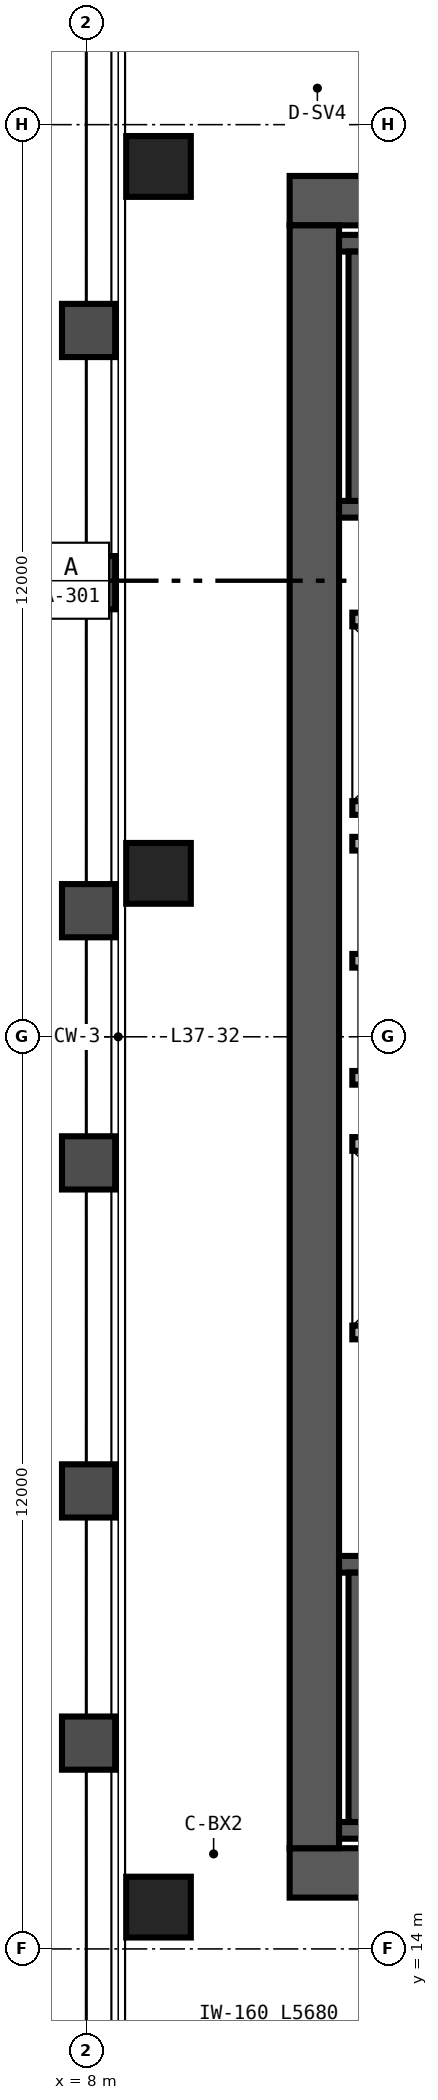
"""IFC4 building model, lengths in metres.
Left out: names, types, materials, properties, quantities, classifications, styles, units other than length and angle.
Written with IfcOpenShell. Run it as: python <this file> out.ifc"""

import sys

from ifc_helpers import new_model, si_unit, direction, frame, frame_2d, origin, origin_2d, place, context, subcontext, project, spatial, rectangle, hollow_rectangle, extrude, source, transform, mapped, element, save


model = new_model("IFC4")
c1 = context("Model", 3, precision=1e-05, world=origin(), true_north=direction((0.0, 1.0)))
c2 = subcontext(c1, "Body", "Model", "MODEL_VIEW")
j1 = project(units=[si_unit("LENGTHUNIT", "METRE"), si_unit("PLANEANGLEUNIT", "RADIAN")], contexts=[c1])
p1 = place(None, origin())
s1 = spatial("IfcSite", under=j1, at=p1, CompositionType="ELEMENT")
p2 = place(p1, origin())
s2 = spatial("IfcBuilding", under=s1, at=p2, CompositionType="ELEMENT")
p3 = place(p2, frame((0.0, 0.0, 147.6)))
s3 = spatial("IfcBuildingStorey", under=s2, at=p3, CompositionType="ELEMENT", Elevation=147.6)
p4 = place(p3, frame((10.675, 15.0, 0.0), z_axis=(0.0, 0.0, 1.0), x_axis=(1.0, 0.0, 0.0)))
e1 = element("IfcWall", 1, at=p4, inside=s3, PredefinedType="SHEAR", context=c2, shape_type="SweptSolid", body=[
    extrude(rectangle(XDim=12.65, YDim=0.65, at=frame_2d((6.325, 0.0))), origin(), (0.0, 0.0, 1.0), 3.28),
])
p5 = place(p4, frame((10.225, 0.0, 0.0)))
e2 = element("IfcOpeningElement", 2, at=p5, cuts=e1, PredefinedType="OPENING", context=c2, shape_type="SweptSolid", body=[
    extrude(rectangle(XDim=1.0, YDim=2.15, at=frame_2d((0.5, 1.075))), frame((0.0, 0.335, 0.0), z_axis=(0.0, -1.0, 0.0), x_axis=(1.0, 0.0, 0.0)), (0.0, 0.0, 1.0), 0.67),
])
p6 = place(p3, frame((10.675, 37.0, 0.0), z_axis=(0.0, 0.0, 1.0), x_axis=(1.0, 0.0, 0.0)))
e3 = element("IfcWall", 3, at=p6, inside=s3, PredefinedType="SHEAR", context=c2, shape_type="SweptSolid", body=[
    extrude(rectangle(XDim=12.65, YDim=0.65, at=frame_2d((6.325, 0.0))), origin(), (0.0, 0.0, 1.0), 3.28),
])
p7 = place(p6, frame((10.425, 0.0, 0.0)))
e4 = element("IfcOpeningElement", 4, at=p7, cuts=e3, PredefinedType="OPENING", context=c2, shape_type="SweptSolid", body=[
    extrude(rectangle(XDim=1.0, YDim=2.15, at=frame_2d((0.5, 1.075))), frame((0.0, 0.335, 0.0), z_axis=(0.0, -1.0, 0.0), x_axis=(1.0, 0.0, 0.0)), (0.0, 0.0, 1.0), 0.67),
])
p8 = place(p3, frame((11.0, 15.325, 0.0), z_axis=(0.0, 0.0, 1.0), x_axis=(0.0, 1.0, 0.0)))
e5 = element("IfcWall", 5, at=p8, inside=s3, PredefinedType="SHEAR", context=c2, shape_type="SweptSolid", body=[
    extrude(rectangle(XDim=21.35, YDim=0.65, at=frame_2d((10.675, 0.0))), origin(), (0.0, 0.0, 1.0), 3.28),
])
p9 = place(p3, frame((11.325, 15.56, 0.0), z_axis=(0.0, 0.0, 1.0), x_axis=(1.0, 0.0, 0.0)))
e6 = element("IfcWall", 6, at=p9, inside=s3, PredefinedType="SHEAR", context=c2, shape_type="SweptSolid", body=[
    extrude(rectangle(XDim=7.985, YDim=0.22, at=frame_2d((3.993, 0.0))), origin(), (0.0, 0.0, 1.0), 3.4),
])
p10 = place(p3, frame((11.325, 19.06, 0.0), z_axis=(0.0, 0.0, 1.0), x_axis=(1.0, 0.0, 0.0)))
e7 = element("IfcWall", 7, at=p10, inside=s3, PredefinedType="SHEAR", context=c2, shape_type="SweptSolid", body=[
    extrude(rectangle(XDim=7.985, YDim=0.22, at=frame_2d((3.993, 0.0))), origin(), (0.0, 0.0, 1.0), 3.4),
])
p11 = place(p10, frame((0.595, 0.0, 0.0)))
e8 = element("IfcOpeningElement", 8, at=p11, cuts=e7, PredefinedType="OPENING", context=c2, shape_type="SweptSolid", body=[
    extrude(rectangle(XDim=1.05, YDim=2.15, at=frame_2d((0.525, 1.075))), frame((0.0, 0.12, 0.0), z_axis=(0.0, -1.0, 0.0), x_axis=(1.0, 0.0, 0.0)), (0.0, 0.0, 1.0), 0.24),
])
p12 = place(p3, frame((11.56, 15.67, 0.0), z_axis=(0.0, 0.0, 1.0), x_axis=(0.0, 1.0, 0.0)))
e9 = element("IfcWall", 9, at=p12, inside=s3, PredefinedType="SHEAR", context=c2, shape_type="SweptSolid", body=[
    extrude(rectangle(XDim=3.28, YDim=0.22, at=frame_2d((1.64, 0.0))), origin(), (0.0, 0.0, 1.0), 3.4),
])
p13 = place(p3, frame((11.325, 32.94, 0.0), z_axis=(0.0, 0.0, 1.0), x_axis=(1.0, 0.0, 0.0)))
e10 = element("IfcWall", 10, at=p13, inside=s3, PredefinedType="SHEAR", context=c2, shape_type="SweptSolid", body=[
    extrude(rectangle(XDim=7.985, YDim=0.22, at=frame_2d((3.993, 0.0))), origin(), (0.0, 0.0, 1.0), 3.4),
])
p14 = place(p13, frame((0.595, 0.0, 0.0)))
e11 = element("IfcOpeningElement", 11, at=p14, cuts=e10, PredefinedType="OPENING", context=c2, shape_type="SweptSolid", body=[
    extrude(rectangle(XDim=1.05, YDim=2.15, at=frame_2d((0.525, 1.075))), frame((0.0, 0.12, 0.0), z_axis=(0.0, -1.0, 0.0), x_axis=(1.0, 0.0, 0.0)), (0.0, 0.0, 1.0), 0.24),
])
p15 = place(p3, frame((11.325, 36.44, 0.0), z_axis=(0.0, 0.0, 1.0), x_axis=(1.0, 0.0, 0.0)))
e12 = element("IfcWall", 12, at=p15, inside=s3, PredefinedType="SHEAR", context=c2, shape_type="SweptSolid", body=[
    extrude(rectangle(XDim=7.985, YDim=0.22, at=frame_2d((3.993, 0.0))), origin(), (0.0, 0.0, 1.0), 3.4),
])
p16 = place(p3, frame((11.56, 33.05, 0.0), z_axis=(0.0, 0.0, 1.0), x_axis=(0.0, 1.0, 0.0)))
e13 = element("IfcWall", 13, at=p16, inside=s3, PredefinedType="SHEAR", context=c2, shape_type="SweptSolid", body=[
    extrude(rectangle(XDim=3.28, YDim=0.22, at=frame_2d((1.64, 0.0))), origin(), (0.0, 0.0, 1.0), 3.4),
])
m1 = source(origin(), c2, "Body", "SweptSolid", [
    extrude(hollow_rectangle(XDim=0.85, YDim=0.8, WallThickness=0.032, at=origin_2d()), origin(), (0.0, 0.0, 1.0), 3.28),
])
for number, where, z_axis, x_axis in (
    (14, (8.95, 14.55, 0.0), (0.0, 0.0, 1.0), (1.0, 0.0, 0.0)),
    (15, (8.95, 28.15, 0.0), (0.0, 0.0, 1.0), (1.0, 0.0, 0.0)),
    (16, (8.95, 37.45, 0.0), (0.0, 0.0, 1.0), (1.0, 0.0, 0.0)),
):
    element("IfcColumn", number, at=place(p3, frame(where, z_axis=z_axis, x_axis=x_axis)), inside=s3, PredefinedType="COLUMN", context=c2, shape_type="MappedRepresentation", body=[
        mapped(m1, transform((0.0, 0.0, 0.0), scale=1.0)),
    ])
for number, where, z_axis, x_axis in (
    (17, (11.5, 22.11, 0.0), (0.0, 0.0, 1.0), (1.0, 0.0, 0.0)),
    (18, (11.5, 24.59, 0.0), (0.0, 0.0, 1.0), (1.0, 0.0, 0.0)),
    (19, (11.5, 29.01, 0.0), (0.0, 0.0, 1.0), (1.0, 0.0, 0.0)),
    (20, (11.5, 31.49, 0.0), (0.0, 0.0, 1.0), (1.0, 0.0, 0.0)),
):
    element("IfcWall", number, at=place(p3, frame(where, z_axis=z_axis, x_axis=x_axis)), inside=s3, PredefinedType="SOLIDWALL", context=c2, shape_type="SweptSolid", body=[
        extrude(rectangle(XDim=2.5, YDim=0.18, at=frame_2d((1.25, 0.0))), origin(), (0.0, 0.0, 1.0), 3.28),
    ])
for number, where, z_axis, x_axis in (
    (21, (11.5, 25.46, 0.0), (0.0, 0.0, 1.0), (1.0, 0.0, 0.0)),
    (22, (11.5, 27.0, 0.0), (0.0, 0.0, 1.0), (1.0, 0.0, 0.0)),
    (23, (11.5, 28.54, 0.0), (0.0, 0.0, 1.0), (1.0, 0.0, 0.0)),
):
    element("IfcWall", number, at=place(p3, frame(where, z_axis=z_axis, x_axis=x_axis)), inside=s3, PredefinedType="SOLIDWALL", context=c2, shape_type="SweptSolid", body=[
        extrude(rectangle(XDim=2.51, YDim=0.18, at=frame_2d((1.255, 0.0))), origin(), (0.0, 0.0, 1.0), 3.28),
    ])
save(model, sys.argv[1])
